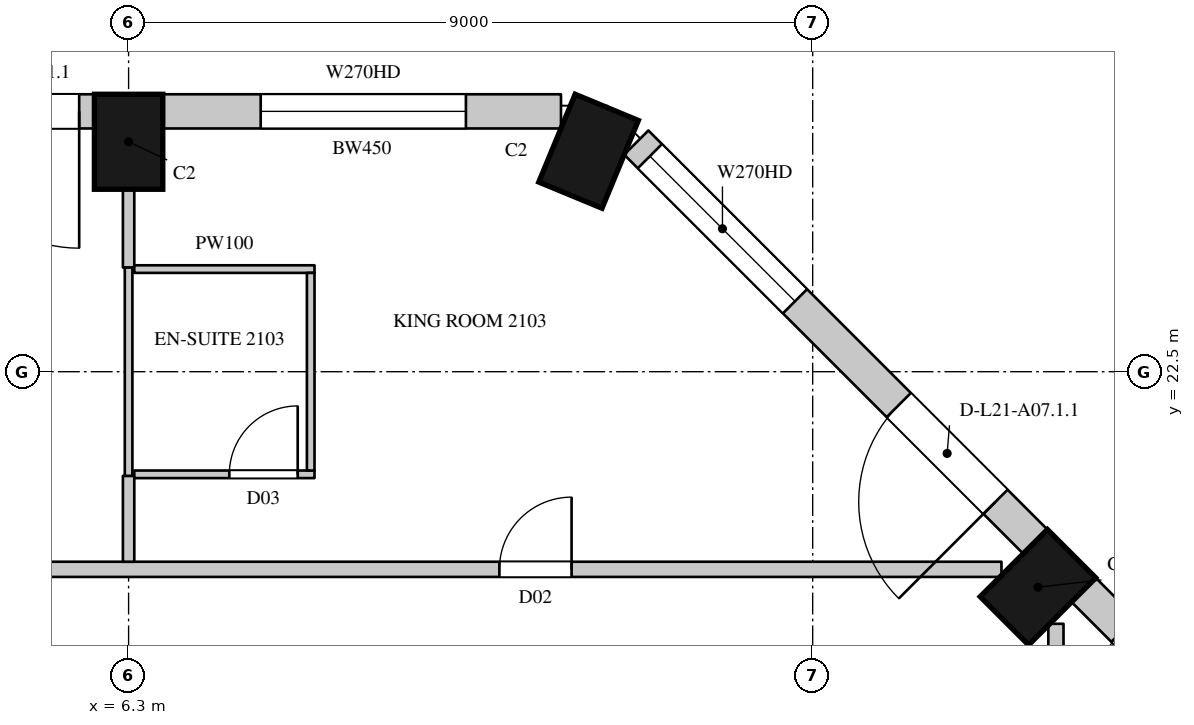
"""IFC4 building model, lengths in metres.
Left out: names, types, materials, properties, quantities, classifications, styles, units other than length and angle.
Written with IfcOpenShell. Run it as: python <this file> out.ifc"""

import sys

from ifc_helpers import new_model, si_unit, direction, frame, frame_2d, origin, origin_2d, place, context, subcontext, project, spatial, rectangle, extrude, element, fill, save


model = new_model("IFC4")
c1 = context("Model", 3, precision=1e-05, world=origin(), true_north=direction((0.0, 1.0)))
c2 = subcontext(c1, "Body", "Model", "MODEL_VIEW")
j1 = project(units=[si_unit("LENGTHUNIT", "METRE"), si_unit("PLANEANGLEUNIT", "RADIAN")], contexts=[c1])
p1 = place(None, origin())
s1 = spatial("IfcSite", under=j1, at=p1, CompositionType="ELEMENT")
p2 = place(p1, origin())
s2 = spatial("IfcBuilding", under=s1, at=p2, CompositionType="ELEMENT")
p3 = place(p2, frame((0.0, 0.0, 105.9)))
s3 = spatial("IfcBuildingStorey", under=s2, at=p3, CompositionType="ELEMENT", Elevation=105.9)
for number, where, z_axis, x_axis in (
    (1, (18.264, 19.664, 0.0), (0.0, 0.0, 1.0), (-0.707, 0.707, 0.0)),
    (2, (12.352, 25.4, 0.0), (0.0, 0.0, 1.0), (-0.924, 0.383, 0.0)),
    (3, (6.3, 25.525, 0.0), (0.0, 0.0, 1.0), (-1.0, 0.0, 0.0)),
):
    element("IfcColumn", number, at=place(p3, frame(where, z_axis=z_axis, x_axis=x_axis)), inside=s3, PredefinedType="COLUMN", context=c2, shape_type="SweptSolid", body=[
        extrude(rectangle(XDim=0.9, YDim=1.25, at=origin_2d()), origin(), (0.0, 0.0, 1.0), 3.6),
    ])
p4 = place(p3, frame((24.115, 14.379, 0.0), z_axis=(0.0, 0.0, 1.0), x_axis=(-0.707106781187, 0.707106781187, 0.0)))
e4 = element("IfcWall", 4, at=p4, inside=s3, PredefinedType="SOLIDWALL", context=c2, shape_type="SweptSolid", body=[
    extrude(rectangle(XDim=7.424, YDim=0.45, at=frame_2d((3.712, 0.0))), origin(), (0.0, 0.0, 1.0), 3.3),
])
p5 = place(p4, frame((0.253, 0.0, 1.05)))
e5 = element("IfcOpeningElement", 5, at=p5, cuts=e4, PredefinedType="OPENING", context=c2, shape_type="SweptSolid", body=[
    extrude(rectangle(XDim=2.7, YDim=2.0, at=frame_2d((1.35, 1.0))), frame((0.0, 0.235, 0.0), z_axis=(0.0, -1.0, 0.0), x_axis=(1.0, 0.0, 0.0)), (0.0, 0.0, 1.0), 0.47),
])
p6 = place(p4, frame((4.884, 0.0, 0.0)))
e6 = element("IfcOpeningElement", 6, at=p6, cuts=e4, PredefinedType="OPENING", context=c2, shape_type="SweptSolid", body=[
    extrude(rectangle(XDim=1.8, YDim=2.4, at=frame_2d((0.9, 1.2))), frame((0.0, 0.235, 0.0), z_axis=(0.0, -1.0, 0.0), x_axis=(1.0, 0.0, 0.0)), (0.0, 0.0, 1.0), 0.47),
])
p7 = place(p3, frame((18.229, 20.265, 0.0), z_axis=(0.0, 0.0, 1.0), x_axis=(-0.707106781187, 0.707106781187, 0.0)))
e7 = element("IfcWall", 7, at=p7, inside=s3, PredefinedType="SOLIDWALL", context=c2, shape_type="SweptSolid", body=[
    extrude(rectangle(XDim=7.424, YDim=0.45, at=frame_2d((3.712, 0.0))), origin(), (0.0, 0.0, 1.0), 3.3),
])
p8 = place(p7, frame((0.74, 0.0, 0.0)))
e8 = element("IfcOpeningElement", 8, at=p8, cuts=e7, PredefinedType="OPENING", context=c2, shape_type="SweptSolid", body=[
    extrude(rectangle(XDim=1.8, YDim=2.4, at=frame_2d((0.9, 1.2))), frame((0.0, 0.235, 0.0), z_axis=(0.0, -1.0, 0.0), x_axis=(1.0, 0.0, 0.0)), (0.0, 0.0, 1.0), 0.47),
])
p9 = place(p7, frame((4.471, 0.0, 1.05)))
e9 = element("IfcOpeningElement", 9, at=p9, cuts=e7, PredefinedType="OPENING", context=c2, shape_type="SweptSolid", body=[
    extrude(rectangle(XDim=2.7, YDim=2.0, at=frame_2d((1.35, 1.0))), frame((0.0, 0.235, 0.0), z_axis=(0.0, -1.0, 0.0), x_axis=(1.0, 0.0, 0.0)), (0.0, 0.0, 1.0), 0.47),
])
p10 = place(p3, frame((11.989, 25.925, 0.0), z_axis=(0.0, 0.0, 1.0), x_axis=(-1.0, 0.0, 0.0)))
e10 = element("IfcWall", 10, at=p10, inside=s3, PredefinedType="SOLIDWALL", context=c2, shape_type="SweptSolid", body=[
    extrude(rectangle(XDim=5.239, YDim=0.45, at=frame_2d((2.619, 0.0))), origin(), (0.0, 0.0, 1.0), 3.3),
])
p11 = place(p10, frame((1.251, 0.0, 1.05)))
e11 = element("IfcOpeningElement", 11, at=p11, cuts=e10, PredefinedType="OPENING", context=c2, shape_type="SweptSolid", body=[
    extrude(rectangle(XDim=2.7, YDim=2.0, at=frame_2d((1.35, 1.0))), frame((0.0, 0.235, 0.0), z_axis=(0.0, -1.0, 0.0), x_axis=(1.0, 0.0, 0.0)), (0.0, 0.0, 1.0), 0.47),
])
p12 = place(p3, frame((5.85, 25.925, 0.0), z_axis=(0.0, 0.0, 1.0), x_axis=(-1.0, 0.0, 0.0)))
e12 = element("IfcWall", 12, at=p12, inside=s3, PredefinedType="SOLIDWALL", context=c2, shape_type="SweptSolid", body=[
    extrude(rectangle(XDim=8.1, YDim=0.45, at=frame_2d((4.05, 0.0))), origin(), (0.0, 0.0, 1.0), 3.3),
])
p13 = place(p12, frame((0.2, 0.0, 0.0)))
e13 = element("IfcOpeningElement", 13, at=p13, cuts=e12, PredefinedType="OPENING", context=c2, shape_type="SweptSolid", body=[
    extrude(rectangle(XDim=1.8, YDim=2.4, at=frame_2d((0.9, 1.2))), frame((0.0, 0.235, 0.0), z_axis=(0.0, -1.0, 0.0), x_axis=(1.0, 0.0, 0.0)), (0.0, 0.0, 1.0), 0.47),
])
p14 = place(p12, frame((2.2, 0.0, 1.05)))
e14 = element("IfcOpeningElement", 14, at=p14, cuts=e12, PredefinedType="OPENING", context=c2, shape_type="SweptSolid", body=[
    extrude(rectangle(XDim=1.2, YDim=2.0, at=frame_2d((0.6, 1.0))), frame((0.0, 0.235, 0.0), z_axis=(0.0, -1.0, 0.0), x_axis=(1.0, 0.0, 0.0)), (0.0, 0.0, 1.0), 0.47),
])
p15 = place(p12, frame((4.7, 0.0, 0.0)))
e15 = element("IfcOpeningElement", 15, at=p15, cuts=e12, PredefinedType="OPENING", context=c2, shape_type="SweptSolid", body=[
    extrude(rectangle(XDim=1.8, YDim=2.4, at=frame_2d((0.9, 1.2))), frame((0.0, 0.235, 0.0), z_axis=(0.0, -1.0, 0.0), x_axis=(1.0, 0.0, 0.0)), (0.0, 0.0, 1.0), 0.47),
])
p16 = place(p12, frame((6.7, 0.0, 1.05)))
e16 = element("IfcOpeningElement", 16, at=p16, cuts=e12, PredefinedType="OPENING", context=c2, shape_type="SweptSolid", body=[
    extrude(rectangle(XDim=1.2, YDim=2.0, at=frame_2d((0.6, 1.0))), frame((0.0, 0.235, 0.0), z_axis=(0.0, -1.0, 0.0), x_axis=(1.0, 0.0, 0.0)), (0.0, 0.0, 1.0), 0.47),
])
p17 = place(p3, frame((19.937, 20.078, 0.0), z_axis=(0.0, 0.0, 1.0), x_axis=(-0.707106781187, 0.707106781187, 0.0)))
e17 = element("IfcWall", 17, at=p17, inside=s3, PredefinedType="SOLIDWALL", context=c2, shape_type="SweptSolid", body=[
    extrude(rectangle(XDim=1.781, YDim=0.45, at=frame_2d((0.89, 0.0))), origin(), (0.0, 0.0, 1.0), 0.6),
])
p18 = place(p3, frame((16.486, 23.529, 0.0), z_axis=(0.0, 0.0, 1.0), x_axis=(-0.707022305137, 0.707191247145, 0.0)))
e18 = element("IfcWall", 18, at=p18, inside=s3, PredefinedType="SOLIDWALL", context=c2, shape_type="SweptSolid", body=[
    extrude(rectangle(XDim=1.445, YDim=0.45, at=frame_2d((0.723, 0.0))), origin(), (0.0, 0.0, 1.0), 0.6),
])
p19 = place(p3, frame((-23.822, 19.9, 0.0), z_axis=(0.0, 0.0, 1.0), x_axis=(1.0, 0.0, 0.0)))
e19 = element("IfcWall", 19, at=p19, inside=s3, PredefinedType="PARTITIONING", context=c2, shape_type="SweptSolid", body=[
    extrude(rectangle(XDim=41.605, YDim=0.2, at=frame_2d((20.803, 0.0))), origin(), (0.0, 0.0, 1.0), 3.3),
])
p20 = place(p19, frame((14.25, 0.0, 0.0)))
e20 = element("IfcOpeningElement", 20, at=p20, cuts=e19, PredefinedType="OPENING", context=c2, shape_type="SweptSolid", body=[
    extrude(rectangle(XDim=0.9, YDim=2.2, at=frame_2d((0.45, 1.1))), frame((0.0, 0.11, 0.0), z_axis=(0.0, -1.0, 0.0), x_axis=(1.0, 0.0, 0.0)), (0.0, 0.0, 1.0), 0.22),
])
p21 = place(p19, frame((27.1, 0.0, 0.0)))
e21 = element("IfcOpeningElement", 21, at=p21, cuts=e19, PredefinedType="OPENING", context=c2, shape_type="SweptSolid", body=[
    extrude(rectangle(XDim=0.9, YDim=2.2, at=frame_2d((0.45, 1.1))), frame((0.0, 0.11, 0.0), z_axis=(0.0, -1.0, 0.0), x_axis=(1.0, 0.0, 0.0)), (0.0, 0.0, 1.0), 0.22),
])
p22 = place(p19, frame((0.8, 0.0, 0.0)))
e22 = element("IfcOpeningElement", 22, at=p22, cuts=e19, PredefinedType="OPENING", context=c2, shape_type="SweptSolid", body=[
    extrude(rectangle(XDim=1.1, YDim=2.4, at=frame_2d((0.55, 1.2))), frame((0.0, 0.11, 0.0), z_axis=(0.0, -1.0, 0.0), x_axis=(1.0, 0.0, 0.0)), (0.0, 0.0, 1.0), 0.22),
])
p23 = place(p19, frame((23.2, 0.0, 0.0)))
e23 = element("IfcOpeningElement", 23, at=p23, cuts=e19, PredefinedType="OPENING", context=c2, shape_type="SweptSolid", body=[
    extrude(rectangle(XDim=0.95, YDim=2.2, at=frame_2d((0.475, 1.1))), frame((0.0, 0.11, 0.0), z_axis=(0.0, -1.0, 0.0), x_axis=(1.0, 0.0, 0.0)), (0.0, 0.0, 1.0), 0.22),
])
p24 = place(p19, frame((35.0, 0.0, 0.0)))
e24 = element("IfcOpeningElement", 24, at=p24, cuts=e19, PredefinedType="OPENING", context=c2, shape_type="SweptSolid", body=[
    extrude(rectangle(XDim=0.95, YDim=2.2, at=frame_2d((0.475, 1.1))), frame((0.0, 0.11, 0.0), z_axis=(0.0, -1.0, 0.0), x_axis=(1.0, 0.0, 0.0)), (0.0, 0.0, 1.0), 0.22),
])
p25 = place(p3, frame((18.5, 4.75, 0.0), z_axis=(0.0, 0.0, 1.0), x_axis=(0.0, 1.0, 0.0)))
e25 = element("IfcWall", 25, at=p25, inside=s3, PredefinedType="PARTITIONING", context=c2, shape_type="SweptSolid", body=[
    extrude(rectangle(XDim=14.434, YDim=0.2, at=frame_2d((7.217, 0.0))), origin(), (0.0, 0.0, 1.0), 3.3),
])
p26 = place(p25, frame((7.65, 0.0, 0.0)))
e26 = element("IfcOpeningElement", 26, at=p26, cuts=e25, PredefinedType="OPENING", context=c2, shape_type="SweptSolid", body=[
    extrude(rectangle(XDim=0.95, YDim=2.2, at=frame_2d((0.475, 1.1))), frame((0.0, 0.11, 0.0), z_axis=(0.0, -1.0, 0.0), x_axis=(1.0, 0.0, 0.0)), (0.0, 0.0, 1.0), 0.22),
])
p27 = place(p3, frame((6.3, 20.0, 0.0), z_axis=(0.0, 0.0, 1.0), x_axis=(0.0, 1.0, 0.0)))
e27 = element("IfcWall", 27, at=p27, inside=s3, PredefinedType="PARTITIONING", context=c2, shape_type="SweptSolid", body=[
    extrude(rectangle(XDim=1.13, YDim=0.15, at=frame_2d((0.565, 0.0))), origin(), (0.0, 0.0, 1.0), 2.75),
])
p28 = place(p3, frame((6.3, 23.87, 0.0), z_axis=(0.0, 0.0, 1.0), x_axis=(0.0, 1.0, 0.0)))
e28 = element("IfcWall", 28, at=p28, inside=s3, PredefinedType="PARTITIONING", context=c2, shape_type="SweptSolid", body=[
    extrude(rectangle(XDim=1.03, YDim=0.15, at=frame_2d((0.515, 0.0))), origin(), (0.0, 0.0, 1.0), 2.75),
])
p29 = place(p3, frame((6.3, 21.13, 0.0), z_axis=(0.0, 0.0, 1.0), x_axis=(0.0, 1.0, 0.0)))
e29 = element("IfcWall", 29, at=p29, inside=s3, PredefinedType="PARTITIONING", context=c2, shape_type="SweptSolid", body=[
    extrude(rectangle(XDim=2.74, YDim=0.1, at=frame_2d((1.37, 0.0))), origin(), (0.0, 0.0, 1.0), 2.75),
])
p30 = place(p3, frame((6.375, 21.15, 0.0), z_axis=(0.0, 0.0, 1.0), x_axis=(1.0, 0.0, 0.0)))
e30 = element("IfcWall", 30, at=p30, inside=s3, PredefinedType="PARTITIONING", context=c2, shape_type="SweptSolid", body=[
    extrude(rectangle(XDim=2.371, YDim=0.1, at=frame_2d((1.186, 0.0))), origin(), (0.0, 0.0, 1.0), 3.3),
])
p31 = place(p30, frame((1.25, 0.0, 0.0)))
e31 = element("IfcOpeningElement", 31, at=p31, cuts=e30, PredefinedType="OPENING", context=c2, shape_type="SweptSolid", body=[
    extrude(rectangle(XDim=0.9, YDim=2.2, at=frame_2d((0.45, 1.1))), frame((0.0, 0.06, 0.0), z_axis=(0.0, -1.0, 0.0), x_axis=(1.0, 0.0, 0.0)), (0.0, 0.0, 1.0), 0.12),
])
p32 = place(p3, frame((6.375, 23.85, 0.0), z_axis=(0.0, 0.0, 1.0), x_axis=(1.0, 0.0, 0.0)))
e32 = element("IfcWall", 32, at=p32, inside=s3, PredefinedType="PARTITIONING", context=c2, shape_type="SweptSolid", body=[
    extrude(rectangle(XDim=2.371, YDim=0.1, at=frame_2d((1.186, 0.0))), origin(), (0.0, 0.0, 1.0), 3.3),
])
p33 = place(p3, frame((8.696, 21.2, 0.0), z_axis=(0.0, 0.0, 1.0), x_axis=(0.0, 1.0, 0.0)))
e33 = element("IfcWall", 33, at=p33, inside=s3, PredefinedType="PARTITIONING", context=c2, shape_type="SweptSolid", body=[
    extrude(rectangle(XDim=2.6, YDim=0.1, at=frame_2d((1.3, 0.0))), origin(), (0.0, 0.0, 1.0), 3.3),
])
p34 = place(p8, origin())
e34 = element("IfcDoor", 34, at=p34, inside=s3, OperationType="SLIDING_TO_LEFT", PredefinedType="DOOR", context=c2, shape_type="SweptSolid", body=[
    extrude(rectangle(XDim=1.8, YDim=2.4, at=frame_2d((0.9, 1.2))), frame((0.0, 0.13, 0.0), z_axis=(0.0, -1.0, 0.0), x_axis=(1.0, 0.0, 0.0)), (0.0, 0.0, 1.0), 0.05),
])
fill(e8, e34)
p35 = place(p9, origin())
e35 = element("IfcWindow", 35, at=p35, inside=s3, PartitioningType="SINGLE_PANEL", PredefinedType="WINDOW", context=c2, shape_type="SweptSolid", body=[
    extrude(rectangle(XDim=2.7, YDim=2.0, at=frame_2d((1.35, 1.0))), frame((0.0, 0.135, 0.0), z_axis=(0.0, -1.0, 0.0), x_axis=(1.0, 0.0, 0.0)), (0.0, 0.0, 1.0), 0.06),
])
fill(e9, e35)
p36 = place(p11, origin())
e36 = element("IfcWindow", 36, at=p36, inside=s3, PartitioningType="SINGLE_PANEL", PredefinedType="WINDOW", context=c2, shape_type="SweptSolid", body=[
    extrude(rectangle(XDim=2.7, YDim=2.0, at=frame_2d((1.35, 1.0))), frame((0.0, 0.135, 0.0), z_axis=(0.0, -1.0, 0.0), x_axis=(1.0, 0.0, 0.0)), (0.0, 0.0, 1.0), 0.06),
])
fill(e11, e36)
p37 = place(p13, origin())
e37 = element("IfcDoor", 37, at=p37, inside=s3, OperationType="SLIDING_TO_LEFT", PredefinedType="DOOR", context=c2, shape_type="SweptSolid", body=[
    extrude(rectangle(XDim=1.8, YDim=2.4, at=frame_2d((0.9, 1.2))), frame((0.0, 0.13, 0.0), z_axis=(0.0, -1.0, 0.0), x_axis=(1.0, 0.0, 0.0)), (0.0, 0.0, 1.0), 0.05),
])
fill(e13, e37)
p38 = place(p24, origin())
e38 = element("IfcDoor", 38, at=p38, inside=s3, OperationType="SINGLE_SWING_RIGHT", PredefinedType="DOOR", context=c2, shape_type="SweptSolid", body=[
    extrude(rectangle(XDim=0.95, YDim=2.2, at=frame_2d((0.475, 1.1))), frame((0.0, 0.025, 0.0), z_axis=(0.0, -1.0, 0.0), x_axis=(1.0, 0.0, 0.0)), (0.0, 0.0, 1.0), 0.05),
])
fill(e24, e38)
p39 = place(p31, origin())
e39 = element("IfcDoor", 39, at=p39, inside=s3, OperationType="SINGLE_SWING_RIGHT", PredefinedType="DOOR", context=c2, shape_type="SweptSolid", body=[
    extrude(rectangle(XDim=0.9, YDim=2.2, at=frame_2d((0.45, 1.1))), frame((0.0, 0.025, 0.0), z_axis=(0.0, -1.0, 0.0), x_axis=(1.0, 0.0, 0.0)), (0.0, 0.0, 1.0), 0.05),
])
fill(e31, e39)
save(model, sys.argv[1])
